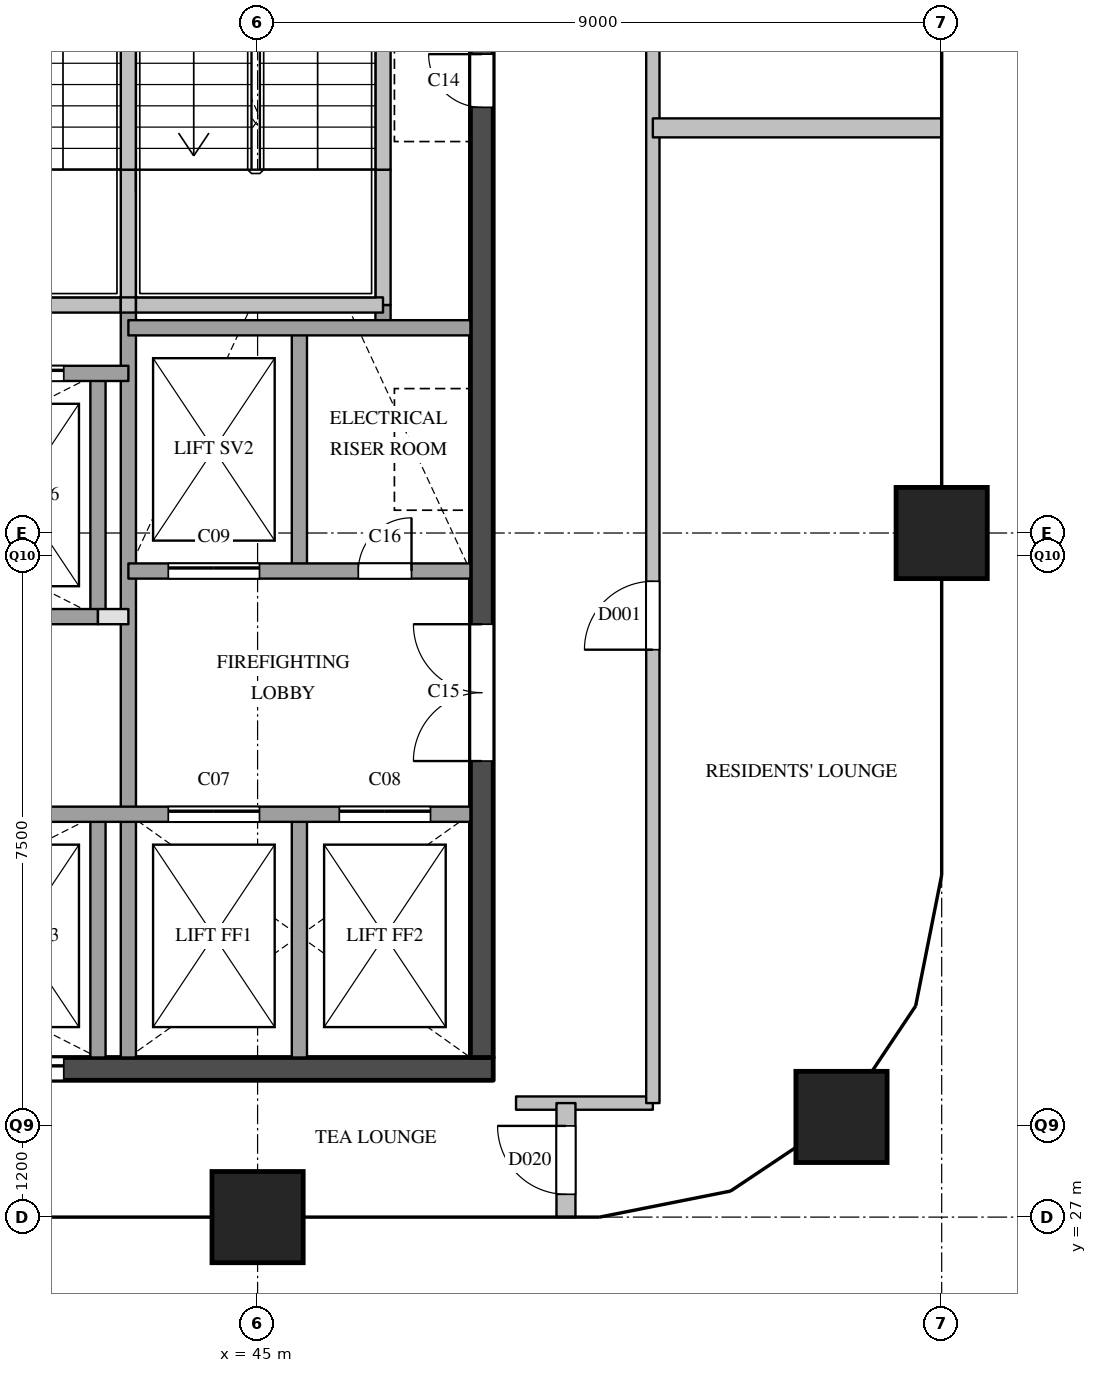
"""IFC4 building model, lengths in metres.
Left out: names, types, materials, properties, quantities, classifications, styles, units other than length and angle.
Written with IfcOpenShell. Run it as: python <this file> out.ifc"""

import sys

from ifc_helpers import new_model, si_unit, direction, frame, frame_2d, origin, origin_2d, place, context, subcontext, project, spatial, rectangle, extrude, element, fill, save


model = new_model("IFC4")
c1 = context("Model", 3, precision=1e-05, world=origin(), true_north=direction((0.0, 1.0)))
c2 = subcontext(c1, "Body", "Model", "MODEL_VIEW")
j1 = project(units=[si_unit("LENGTHUNIT", "METRE"), si_unit("PLANEANGLEUNIT", "RADIAN")], contexts=[c1])
p1 = place(None, origin())
s1 = spatial("IfcSite", under=j1, at=p1, CompositionType="ELEMENT")
p2 = place(p1, origin())
s2 = spatial("IfcBuilding", under=s1, at=p2, CompositionType="ELEMENT")
p3 = place(p2, frame((0.0, 0.0, 301.2)))
s3 = spatial("IfcBuildingStorey", under=s2, at=p3, CompositionType="ELEMENT", Elevation=301.2)
for number, where, z_axis, x_axis in (
    (1, (45.0, 27.0, 0.0), (0.0, 0.0, 1.0), (1.0, 0.0, 0.0)),
    (2, (52.682, 28.318, 0.0), (0.0, 0.0, 1.0), (1.0, 0.0, 0.0)),
    (3, (54.0, 36.0, 0.0), (0.0, 0.0, 1.0), (1.0, 0.0, 0.0)),
):
    element("IfcColumn", number, at=place(p3, frame(where, z_axis=z_axis, x_axis=x_axis)), inside=s3, PredefinedType="COLUMN", context=c2, shape_type="SweptSolid", body=[
        extrude(rectangle(XDim=1.2, YDim=1.2, at=origin_2d()), origin(), (0.0, 0.0, 1.0), 3.9),
    ])
p4 = place(p3, frame((36.3, 28.95, 0.0), z_axis=(0.0, 0.0, 1.0), x_axis=(1.0, 0.0, 0.0)))
e4 = element("IfcWall", 4, at=p4, inside=s3, PredefinedType="SHEAR", context=c2, shape_type="SweptSolid", body=[
    extrude(rectangle(XDim=11.8, YDim=0.3, at=frame_2d((5.9, 0.0))), origin(), (0.0, 0.0, 1.0), 3.6),
])
p5 = place(p4, frame((0.75, 0.0, 0.0)))
e5 = element("IfcOpeningElement", 5, at=p5, cuts=e4, PredefinedType="OPENING", context=c2, shape_type="SweptSolid", body=[
    extrude(rectangle(XDim=1.2, YDim=2.1, at=frame_2d((0.6, 1.05))), frame((0.0, 0.16, 0.0), z_axis=(0.0, -1.0, 0.0), x_axis=(1.0, 0.0, 0.0)), (0.0, 0.0, 1.0), 0.32),
])
p6 = place(p4, frame((2.85, 0.0, 0.0)))
e6 = element("IfcOpeningElement", 6, at=p6, cuts=e4, PredefinedType="OPENING", context=c2, shape_type="SweptSolid", body=[
    extrude(rectangle(XDim=1.2, YDim=2.1, at=frame_2d((0.6, 1.05))), frame((0.0, 0.16, 0.0), z_axis=(0.0, -1.0, 0.0), x_axis=(1.0, 0.0, 0.0)), (0.0, 0.0, 1.0), 0.32),
])
p7 = place(p4, frame((4.95, 0.0, 0.0)))
e7 = element("IfcOpeningElement", 7, at=p7, cuts=e4, PredefinedType="OPENING", context=c2, shape_type="SweptSolid", body=[
    extrude(rectangle(XDim=1.2, YDim=2.1, at=frame_2d((0.6, 1.05))), frame((0.0, 0.16, 0.0), z_axis=(0.0, -1.0, 0.0), x_axis=(1.0, 0.0, 0.0)), (0.0, 0.0, 1.0), 0.32),
])
p8 = place(p3, frame((47.95, 29.1, 0.0), z_axis=(0.0, 0.0, 1.0), x_axis=(0.0, 1.0, 0.0)))
e8 = element("IfcWall", 8, at=p8, inside=s3, PredefinedType="SHEAR", context=c2, shape_type="SweptSolid", body=[
    extrude(rectangle(XDim=20.3, YDim=0.3, at=frame_2d((10.15, 0.0))), origin(), (0.0, 0.0, 1.0), 3.6),
])
p9 = place(p8, frame((12.5, 0.0, 0.0)))
e9 = element("IfcOpeningElement", 9, at=p9, cuts=e8, PredefinedType="OPENING", context=c2, shape_type="SweptSolid", body=[
    extrude(rectangle(XDim=0.7, YDim=2.1, at=frame_2d((0.35, 1.05))), frame((0.0, 0.16, 0.0), z_axis=(0.0, -1.0, 0.0), x_axis=(1.0, 0.0, 0.0)), (0.0, 0.0, 1.0), 0.32),
])
p10 = place(p8, frame((3.9, 0.0, 0.0)))
e10 = element("IfcOpeningElement", 10, at=p10, cuts=e8, PredefinedType="OPENING", context=c2, shape_type="SweptSolid", body=[
    extrude(rectangle(XDim=1.8, YDim=2.1, at=frame_2d((0.9, 1.05))), frame((0.0, 0.16, 0.0), z_axis=(0.0, -1.0, 0.0), x_axis=(1.0, 0.0, 0.0)), (0.0, 0.0, 1.0), 0.32),
])
p11 = place(p3, frame((42.9, 29.1, 0.0), z_axis=(0.0, 0.0, 1.0), x_axis=(0.0, 1.0, 0.0)))
e11 = element("IfcWall", 11, at=p11, inside=s3, PredefinedType="SOLIDWALL", context=c2, shape_type="SweptSolid", body=[
    extrude(rectangle(XDim=3.2, YDim=0.2, at=frame_2d((1.6, 0.0))), origin(), (0.0, 0.0, 1.0), 3.6),
])
p12 = place(p3, frame((42.9, 34.9, 0.0), z_axis=(0.0, 0.0, 1.0), x_axis=(0.0, 1.0, 0.0)))
e12 = element("IfcWall", 12, at=p12, inside=s3, PredefinedType="SOLIDWALL", context=c2, shape_type="SweptSolid", body=[
    extrude(rectangle(XDim=3.2, YDim=0.2, at=frame_2d((1.6, 0.0))), origin(), (0.0, 0.0, 1.0), 3.6),
])
p13 = place(p3, frame((43.3, 29.1, 0.0), z_axis=(0.0, 0.0, 1.0), x_axis=(0.0, 1.0, 0.0)))
e13 = element("IfcWall", 13, at=p13, inside=s3, PredefinedType="SOLIDWALL", context=c2, shape_type="SweptSolid", body=[
    extrude(rectangle(XDim=9.9, YDim=0.2, at=frame_2d((4.95, 0.0))), origin(), (0.0, 0.0, 1.0), 3.6),
])
p14 = place(p3, frame((43.3, 39.0, 0.0), z_axis=(0.0, 0.0, 1.0), x_axis=(0.0, 1.0, 0.0)))
e14 = element("IfcWall", 14, at=p14, inside=s3, PredefinedType="SOLIDWALL", context=c2, shape_type="SweptSolid", body=[
    extrude(rectangle(XDim=1.78, YDim=0.2, at=frame_2d((0.89, 0.0))), origin(), (0.0, 0.0, 1.0), 3.6),
])
p15 = place(p3, frame((43.3, 40.78, 0.0), z_axis=(0.0, 0.0, 1.0), x_axis=(0.0, 1.0, 0.0)))
e15 = element("IfcWall", 15, at=p15, inside=s3, PredefinedType="SOLIDWALL", context=c2, shape_type="SweptSolid", body=[
    extrude(rectangle(XDim=4.42, YDim=0.2, at=frame_2d((2.21, 0.0))), origin(), (0.0, 0.0, 1.0), 3.6),
])
for number, where, z_axis, x_axis in (
    (16, (45.55, 29.1, 0.0), (0.0, 0.0, 1.0), (0.0, 1.0, 0.0)),
    (17, (45.55, 35.5, 0.0), (0.0, 0.0, 1.0), (0.0, 1.0, 0.0)),
):
    element("IfcWall", number, at=place(p3, frame(where, z_axis=z_axis, x_axis=x_axis)), inside=s3, PredefinedType="SOLIDWALL", context=c2, shape_type="SweptSolid", body=[
        extrude(rectangle(XDim=3.2, YDim=0.2, at=frame_2d((1.6, 0.0))), origin(), (0.0, 0.0, 1.0), 3.6),
    ])
p16 = place(p3, frame((46.65, 38.7, 0.0), z_axis=(0.0, 0.0, 1.0), x_axis=(0.0, 1.0, 0.0)))
e18 = element("IfcWall", 18, at=p16, inside=s3, PredefinedType="SOLIDWALL", context=c2, shape_type="SweptSolid", body=[
    extrude(rectangle(XDim=0.3, YDim=0.2, at=frame_2d((0.15, 0.0))), origin(), (0.0, 0.0, 1.0), 3.6),
])
p17 = place(p3, frame((46.65, 39.0, 0.0), z_axis=(0.0, 0.0, 1.0), x_axis=(0.0, 1.0, 0.0)))
e19 = element("IfcWall", 19, at=p17, inside=s3, PredefinedType="SOLIDWALL", context=c2, shape_type="SweptSolid", body=[
    extrude(rectangle(XDim=1.78, YDim=0.2, at=frame_2d((0.89, 0.0))), origin(), (0.0, 0.0, 1.0), 3.6),
])
p18 = place(p3, frame((46.65, 40.78, 0.0), z_axis=(0.0, 0.0, 1.0), x_axis=(0.0, 1.0, 0.0)))
e20 = element("IfcWall", 20, at=p18, inside=s3, PredefinedType="SOLIDWALL", context=c2, shape_type="SweptSolid", body=[
    extrude(rectangle(XDim=4.42, YDim=0.2, at=frame_2d((2.21, 0.0))), origin(), (0.0, 0.0, 1.0), 3.6),
])
p19 = place(p3, frame((36.6, 32.3, 0.0), z_axis=(0.0, 0.0, 1.0), x_axis=(1.0, 0.0, 0.0)))
e21 = element("IfcWall", 21, at=p19, inside=s3, PredefinedType="SOLIDWALL", context=c2, shape_type="SweptSolid", body=[
    extrude(rectangle(XDim=11.2, YDim=0.2, at=frame_2d((5.6, 0.0))), origin(), (0.0, 0.0, 1.0), 3.6),
])
p20 = place(p19, frame((7.225, 0.0, 0.0)))
e22 = element("IfcOpeningElement", 22, at=p20, cuts=e21, PredefinedType="OPENING", context=c2, shape_type="SweptSolid", body=[
    extrude(rectangle(XDim=1.2, YDim=2.1, at=frame_2d((0.6, 1.05))), frame((0.0, 0.11, 0.0), z_axis=(0.0, -1.0, 0.0), x_axis=(1.0, 0.0, 0.0)), (0.0, 0.0, 1.0), 0.22),
])
p21 = place(p19, frame((9.475, 0.0, 0.0)))
e23 = element("IfcOpeningElement", 23, at=p21, cuts=e21, PredefinedType="OPENING", context=c2, shape_type="SweptSolid", body=[
    extrude(rectangle(XDim=1.2, YDim=2.1, at=frame_2d((0.6, 1.05))), frame((0.0, 0.11, 0.0), z_axis=(0.0, -1.0, 0.0), x_axis=(1.0, 0.0, 0.0)), (0.0, 0.0, 1.0), 0.22),
])
p22 = place(p3, frame((42.9, 34.9, 0.0), z_axis=(0.0, 0.0, 1.0), x_axis=(1.0, 0.0, 0.0)))
e24 = element("IfcWall", 24, at=p22, inside=s3, PredefinedType="PARTITIONING", context=c2, shape_type="SweptSolid", body=[
    extrude(rectangle(XDim=0.4, YDim=0.2, at=frame_2d((0.2, 0.0))), origin(), (0.0, 0.0, 1.0), 3.6),
])
p23 = place(p3, frame((36.6, 34.9, 0.0), z_axis=(0.0, 0.0, 1.0), x_axis=(1.0, 0.0, 0.0)))
e25 = element("IfcWall", 25, at=p23, inside=s3, PredefinedType="SOLIDWALL", context=c2, shape_type="SweptSolid", body=[
    extrude(rectangle(XDim=6.3, YDim=0.2, at=frame_2d((3.15, 0.0))), origin(), (0.0, 0.0, 1.0), 3.6),
])
p24 = place(p3, frame((43.3, 35.5, 0.0), z_axis=(0.0, 0.0, 1.0), x_axis=(1.0, 0.0, 0.0)))
e26 = element("IfcWall", 26, at=p24, inside=s3, PredefinedType="SOLIDWALL", context=c2, shape_type="SweptSolid", body=[
    extrude(rectangle(XDim=4.5, YDim=0.2, at=frame_2d((2.25, 0.0))), origin(), (0.0, 0.0, 1.0), 3.6),
])
p25 = place(p24, frame((0.525, 0.0, 0.0)))
e27 = element("IfcOpeningElement", 27, at=p25, cuts=e26, PredefinedType="OPENING", context=c2, shape_type="SweptSolid", body=[
    extrude(rectangle(XDim=1.2, YDim=2.1, at=frame_2d((0.6, 1.05))), frame((0.0, 0.11, 0.0), z_axis=(0.0, -1.0, 0.0), x_axis=(1.0, 0.0, 0.0)), (0.0, 0.0, 1.0), 0.22),
])
p26 = place(p24, frame((3.025, 0.0, 0.0)))
e28 = element("IfcOpeningElement", 28, at=p26, cuts=e26, PredefinedType="OPENING", context=c2, shape_type="SweptSolid", body=[
    extrude(rectangle(XDim=0.7, YDim=2.1, at=frame_2d((0.35, 1.05))), frame((0.0, 0.11, 0.0), z_axis=(0.0, -1.0, 0.0), x_axis=(1.0, 0.0, 0.0)), (0.0, 0.0, 1.0), 0.22),
])
p27 = place(p3, frame((36.6, 38.1, 0.0), z_axis=(0.0, 0.0, 1.0), x_axis=(1.0, 0.0, 0.0)))
e29 = element("IfcWall", 29, at=p27, inside=s3, PredefinedType="SOLIDWALL", context=c2, shape_type="SweptSolid", body=[
    extrude(rectangle(XDim=6.7, YDim=0.2, at=frame_2d((3.35, 0.0))), origin(), (0.0, 0.0, 1.0), 3.6),
])
p28 = place(p27, frame((0.45, 0.0, 0.0)))
e30 = element("IfcOpeningElement", 30, at=p28, cuts=e29, PredefinedType="OPENING", context=c2, shape_type="SweptSolid", body=[
    extrude(rectangle(XDim=1.2, YDim=2.1, at=frame_2d((0.6, 1.05))), frame((0.0, 0.11, 0.0), z_axis=(0.0, -1.0, 0.0), x_axis=(1.0, 0.0, 0.0)), (0.0, 0.0, 1.0), 0.22),
])
p29 = place(p27, frame((2.55, 0.0, 0.0)))
e31 = element("IfcOpeningElement", 31, at=p29, cuts=e29, PredefinedType="OPENING", context=c2, shape_type="SweptSolid", body=[
    extrude(rectangle(XDim=1.2, YDim=2.1, at=frame_2d((0.6, 1.05))), frame((0.0, 0.11, 0.0), z_axis=(0.0, -1.0, 0.0), x_axis=(1.0, 0.0, 0.0)), (0.0, 0.0, 1.0), 0.22),
])
p30 = place(p27, frame((4.65, 0.0, 0.0)))
e32 = element("IfcOpeningElement", 32, at=p30, cuts=e29, PredefinedType="OPENING", context=c2, shape_type="SweptSolid", body=[
    extrude(rectangle(XDim=1.2, YDim=2.1, at=frame_2d((0.6, 1.05))), frame((0.0, 0.11, 0.0), z_axis=(0.0, -1.0, 0.0), x_axis=(1.0, 0.0, 0.0)), (0.0, 0.0, 1.0), 0.22),
])
p31 = place(p3, frame((43.3, 38.7, 0.0), z_axis=(0.0, 0.0, 1.0), x_axis=(1.0, 0.0, 0.0)))
e33 = element("IfcWall", 33, at=p31, inside=s3, PredefinedType="SOLIDWALL", context=c2, shape_type="SweptSolid", body=[
    extrude(rectangle(XDim=4.5, YDim=0.2, at=frame_2d((2.25, 0.0))), origin(), (0.0, 0.0, 1.0), 3.6),
])
p32 = place(p3, frame((40.05, 39.0, 0.0), z_axis=(0.0, 0.0, 1.0), x_axis=(1.0, 0.0, 0.0)))
e34 = element("IfcWall", 34, at=p32, inside=s3, PredefinedType="SOLIDWALL", context=c2, shape_type="SweptSolid", body=[
    extrude(rectangle(XDim=3.15, YDim=0.2, at=frame_2d((1.575, 0.0))), origin(), (0.0, 0.0, 1.0), 3.6),
])
p33 = place(p3, frame((43.2, 39.0, 0.0), z_axis=(0.0, 0.0, 1.0), x_axis=(1.0, 0.0, 0.0)))
e35 = element("IfcWall", 35, at=p33, inside=s3, PredefinedType="SOLIDWALL", context=c2, shape_type="SweptSolid", body=[
    extrude(rectangle(XDim=0.2, YDim=0.2, at=frame_2d((0.1, 0.0))), origin(), (0.0, 0.0, 1.0), 3.6),
])
p34 = place(p3, frame((43.4, 39.0, 0.0), z_axis=(0.0, 0.0, 1.0), x_axis=(1.0, 0.0, 0.0)))
e36 = element("IfcWall", 36, at=p34, inside=s3, PredefinedType="SOLIDWALL", context=c2, shape_type="SweptSolid", body=[
    extrude(rectangle(XDim=3.25, YDim=0.2, at=frame_2d((1.625, 0.0))), origin(), (0.0, 0.0, 1.0), 3.6),
])
p35 = place(p3, frame((48.4, 28.5, 0.0), z_axis=(0.0, 0.0, 1.0), x_axis=(1.0, 0.0, 0.0)))
e37 = element("IfcWall", 37, at=p35, inside=s3, PredefinedType="PARTITIONING", context=c2, shape_type="SweptSolid", body=[
    extrude(rectangle(XDim=1.8, YDim=0.175, at=frame_2d((0.9, 0.0))), origin(), (0.0, 0.0, 1.0), 3.6),
])
p36 = place(p3, frame((50.2, 28.5, 0.0), z_axis=(0.0, 0.0, 1.0), x_axis=(0.0, 1.0, 0.0)))
e38 = element("IfcWall", 38, at=p36, inside=s3, PredefinedType="PARTITIONING", context=c2, shape_type="SweptSolid", body=[
    extrude(rectangle(XDim=23.3, YDim=0.175, at=frame_2d((11.65, 0.0))), origin(), (0.0, 0.0, 1.0), 3.6),
])
p37 = place(p36, frame((5.965, 0.0, 0.0)))
e39 = element("IfcOpeningElement", 39, at=p37, cuts=e38, PredefinedType="OPENING", context=c2, shape_type="SweptSolid", body=[
    extrude(rectangle(XDim=0.9, YDim=2.1, at=frame_2d((0.45, 1.05))), frame((0.0, 0.097, 0.0), z_axis=(0.0, -1.0, 0.0), x_axis=(1.0, 0.0, 0.0)), (0.0, 0.0, 1.0), 0.195),
])
p38 = place(p36, frame((17.615, 0.0, 0.0)))
e40 = element("IfcOpeningElement", 40, at=p38, cuts=e38, PredefinedType="OPENING", context=c2, shape_type="SweptSolid", body=[
    extrude(rectangle(XDim=0.9, YDim=2.1, at=frame_2d((0.45, 1.05))), frame((0.0, 0.097, 0.0), z_axis=(0.0, -1.0, 0.0), x_axis=(1.0, 0.0, 0.0)), (0.0, 0.0, 1.0), 0.195),
])
p39 = place(p3, frame((50.2, 41.33, 0.0), z_axis=(0.0, 0.0, 1.0), x_axis=(1.0, 0.0, 0.0)))
e41 = element("IfcWall", 41, at=p39, inside=s3, PredefinedType="PARTITIONING", context=c2, shape_type="SweptSolid", body=[
    extrude(rectangle(XDim=3.8, YDim=0.25, at=frame_2d((1.9, 0.0))), origin(), (0.0, 0.0, 1.0), 2.6),
])
p40 = place(p3, frame((49.057, 27.0, 0.0), z_axis=(0.0, 0.0, 1.0), x_axis=(0.0, 1.0, 0.0)))
e42 = element("IfcWall", 42, at=p40, inside=s3, PredefinedType="PARTITIONING", context=c2, shape_type="SweptSolid", body=[
    extrude(rectangle(XDim=1.5, YDim=0.25, at=frame_2d((0.75, 0.0))), origin(), (0.0, 0.0, 1.0), 2.6),
])
p41 = place(p40, frame((0.3, 0.0, 0.0)))
e43 = element("IfcOpeningElement", 43, at=p41, cuts=e42, PredefinedType="OPENING", context=c2, shape_type="SweptSolid", body=[
    extrude(rectangle(XDim=0.9, YDim=2.1, at=frame_2d((0.45, 1.05))), frame((0.0, 0.135, 0.0), z_axis=(0.0, -1.0, 0.0), x_axis=(1.0, 0.0, 0.0)), (0.0, 0.0, 1.0), 0.27),
])
p42 = place(p7, origin())
e44 = element("IfcDoor", 44, at=p42, inside=s3, OperationType="SLIDING_TO_LEFT", PredefinedType="DOOR", context=c2, shape_type="SweptSolid", body=[
    extrude(rectangle(XDim=1.2, YDim=2.1, at=frame_2d((0.6, 1.05))), frame((0.0, 0.025, 0.0), z_axis=(0.0, -1.0, 0.0), x_axis=(1.0, 0.0, 0.0)), (0.0, 0.0, 1.0), 0.05),
])
fill(e7, e44)
p43 = place(p30, origin())
e45 = element("IfcDoor", 45, at=p43, inside=s3, OperationType="SLIDING_TO_LEFT", PredefinedType="DOOR", context=c2, shape_type="SweptSolid", body=[
    extrude(rectangle(XDim=1.2, YDim=2.1, at=frame_2d((0.6, 1.05))), frame((0.0, 0.025, 0.0), z_axis=(0.0, -1.0, 0.0), x_axis=(1.0, 0.0, 0.0)), (0.0, 0.0, 1.0), 0.05),
])
fill(e32, e45)
p44 = place(p20, origin())
e46 = element("IfcDoor", 46, at=p44, inside=s3, OperationType="SLIDING_TO_LEFT", PredefinedType="DOOR", context=c2, shape_type="SweptSolid", body=[
    extrude(rectangle(XDim=1.2, YDim=2.1, at=frame_2d((0.6, 1.05))), frame((0.0, 0.025, 0.0), z_axis=(0.0, -1.0, 0.0), x_axis=(1.0, 0.0, 0.0)), (0.0, 0.0, 1.0), 0.05),
])
fill(e22, e46)
p45 = place(p21, origin())
e47 = element("IfcDoor", 47, at=p45, inside=s3, OperationType="SLIDING_TO_LEFT", PredefinedType="DOOR", context=c2, shape_type="SweptSolid", body=[
    extrude(rectangle(XDim=1.2, YDim=2.1, at=frame_2d((0.6, 1.05))), frame((0.0, 0.025, 0.0), z_axis=(0.0, -1.0, 0.0), x_axis=(1.0, 0.0, 0.0)), (0.0, 0.0, 1.0), 0.05),
])
fill(e23, e47)
p46 = place(p25, origin())
e48 = element("IfcDoor", 48, at=p46, inside=s3, OperationType="SLIDING_TO_LEFT", PredefinedType="DOOR", context=c2, shape_type="SweptSolid", body=[
    extrude(rectangle(XDim=1.2, YDim=2.1, at=frame_2d((0.6, 1.05))), frame((0.0, 0.025, 0.0), z_axis=(0.0, -1.0, 0.0), x_axis=(1.0, 0.0, 0.0)), (0.0, 0.0, 1.0), 0.05),
])
fill(e27, e48)
p47 = place(p9, origin())
e49 = element("IfcDoor", 49, at=p47, inside=s3, OperationType="SINGLE_SWING_RIGHT", PredefinedType="DOOR", context=c2, shape_type="SweptSolid", body=[
    extrude(rectangle(XDim=0.7, YDim=2.1, at=frame_2d((0.35, 1.05))), frame((0.0, 0.025, 0.0), z_axis=(0.0, -1.0, 0.0), x_axis=(1.0, 0.0, 0.0)), (0.0, 0.0, 1.0), 0.05),
])
fill(e9, e49)
p48 = place(p10, origin())
e50 = element("IfcDoor", 50, at=p48, inside=s3, OperationType="DOUBLE_DOOR_SINGLE_SWING", PredefinedType="DOOR", context=c2, shape_type="SweptSolid", body=[
    extrude(rectangle(XDim=1.8, YDim=2.1, at=frame_2d((0.9, 1.05))), frame((0.0, 0.025, 0.0), z_axis=(0.0, -1.0, 0.0), x_axis=(1.0, 0.0, 0.0)), (0.0, 0.0, 1.0), 0.05),
])
fill(e10, e50)
p49 = place(p26, origin())
e51 = element("IfcDoor", 51, at=p49, inside=s3, OperationType="SINGLE_SWING_RIGHT", PredefinedType="DOOR", context=c2, shape_type="SweptSolid", body=[
    extrude(rectangle(XDim=0.7, YDim=2.1, at=frame_2d((0.35, 1.05))), frame((0.0, 0.025, 0.0), z_axis=(0.0, -1.0, 0.0), x_axis=(1.0, 0.0, 0.0)), (0.0, 0.0, 1.0), 0.05),
])
fill(e28, e51)
p50 = place(p37, origin())
e52 = element("IfcDoor", 52, at=p50, inside=s3, OperationType="SINGLE_SWING_LEFT", PredefinedType="DOOR", context=c2, shape_type="SweptSolid", body=[
    extrude(rectangle(XDim=0.9, YDim=2.1, at=frame_2d((0.45, 1.05))), frame((0.0, 0.025, 0.0), z_axis=(0.0, -1.0, 0.0), x_axis=(1.0, 0.0, 0.0)), (0.0, 0.0, 1.0), 0.05),
])
fill(e39, e52)
p51 = place(p41, origin())
e53 = element("IfcDoor", 53, at=p51, inside=s3, OperationType="SINGLE_SWING_RIGHT", PredefinedType="DOOR", context=c2, shape_type="SweptSolid", body=[
    extrude(rectangle(XDim=0.9, YDim=2.1, at=frame_2d((0.45, 1.05))), frame((0.0, 0.025, 0.0), z_axis=(0.0, -1.0, 0.0), x_axis=(1.0, 0.0, 0.0)), (0.0, 0.0, 1.0), 0.05),
])
fill(e43, e53)
save(model, sys.argv[1])
